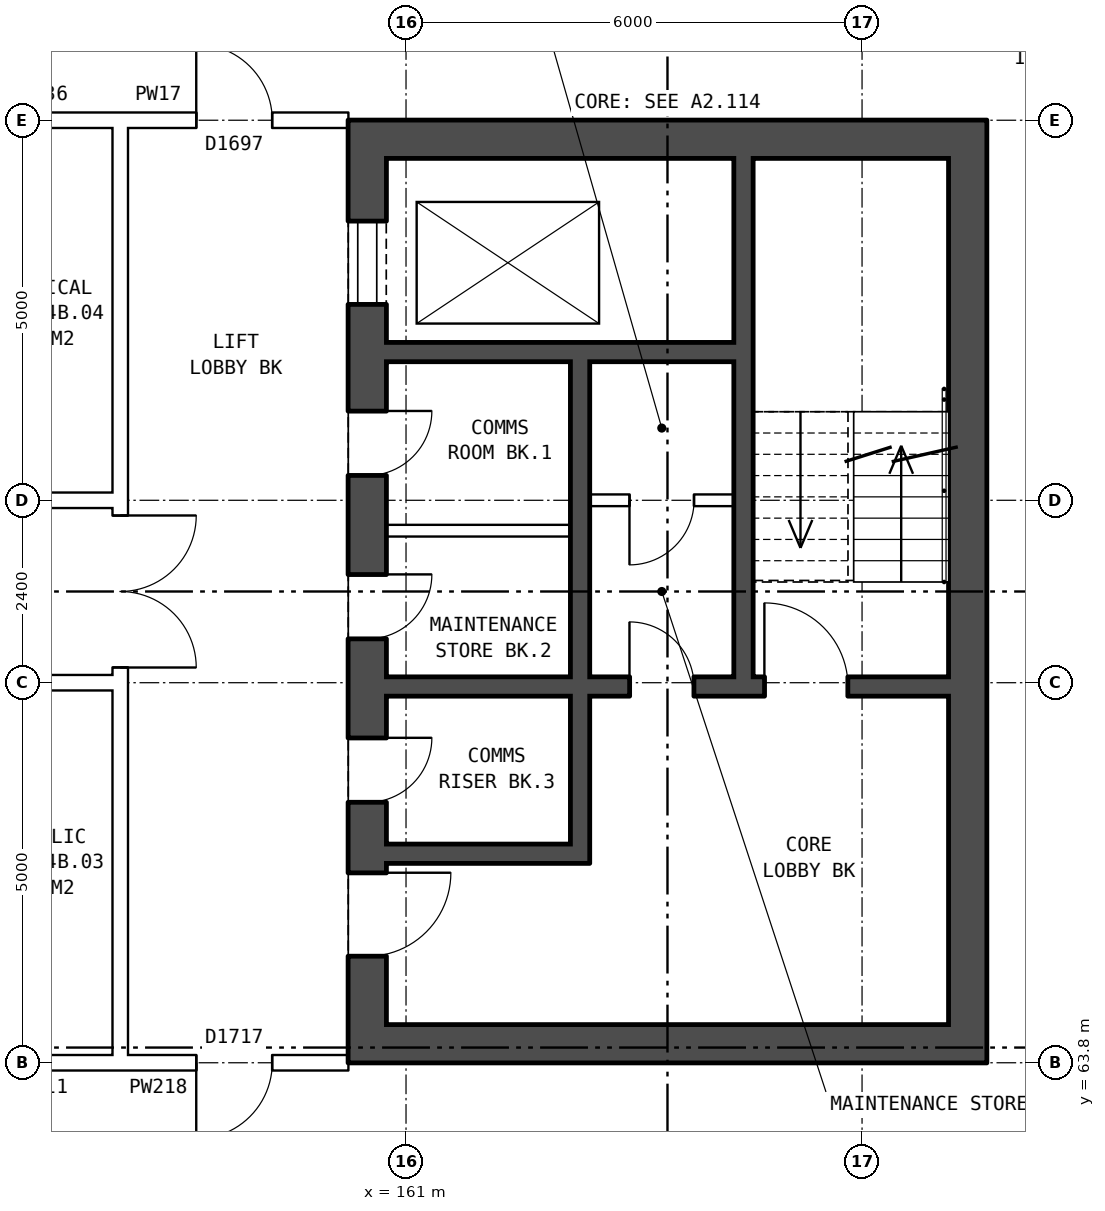
"""IFC4 building model, lengths in metres.
Left out: names, types, materials, properties, quantities, classifications, styles, units other than length and angle.
Written with IfcOpenShell. Run it as: python <this file> out.ifc"""

import sys

from ifc_helpers import new_model, si_unit, direction, frame, frame_2d, origin, place, context, subcontext, project, spatial, rectangle, extrude, element, fill, save


model = new_model("IFC4")
c1 = context("Model", 3, precision=1e-05, world=origin(), true_north=direction((0.0, 1.0)))
c2 = subcontext(c1, "Body", "Model", "MODEL_VIEW")
j1 = project(units=[si_unit("LENGTHUNIT", "METRE"), si_unit("PLANEANGLEUNIT", "RADIAN")], contexts=[c1])
p1 = place(None, origin())
s1 = spatial("IfcSite", under=j1, at=p1, CompositionType="ELEMENT")
p2 = place(p1, origin())
s2 = spatial("IfcBuilding", under=s1, at=p2, CompositionType="ELEMENT")
p3 = place(p2, frame((0.0, 0.0, 157.8)))
s3 = spatial("IfcBuildingStorey", under=s2, at=p3, CompositionType="ELEMENT", Elevation=157.8)
p4 = place(p3, frame((160.49, 76.2, 0.0), z_axis=(0.0, 0.0, 1.0), x_axis=(0.0, -1.0, 0.0)))
e1 = element("IfcWall", 1, at=p4, inside=s3, PredefinedType="SHEAR", context=c2, shape_type="SweptSolid", body=[
    extrude(rectangle(XDim=12.4, YDim=0.5, at=frame_2d((6.2, 0.0))), origin(), (0.0, 0.0, 1.0), 2.85),
])
p5 = place(p4, frame((1.325, 0.0, 0.0)))
e2 = element("IfcOpeningElement", 2, at=p5, cuts=e1, PredefinedType="OPENING", context=c2, shape_type="SweptSolid", body=[
    extrude(rectangle(XDim=1.1, YDim=2.1, at=frame_2d((0.55, 1.05))), frame((0.0, 0.26, 0.0), z_axis=(0.0, -1.0, 0.0), x_axis=(1.0, 0.0, 0.0)), (0.0, 0.0, 1.0), 0.52),
])
p6 = place(p4, frame((3.825, 0.0, 0.0)))
e3 = element("IfcOpeningElement", 3, at=p6, cuts=e1, PredefinedType="OPENING", context=c2, shape_type="SweptSolid", body=[
    extrude(rectangle(XDim=0.85, YDim=2.1, at=frame_2d((0.425, 1.05))), frame((0.0, 0.26, 0.0), z_axis=(0.0, -1.0, 0.0), x_axis=(1.0, 0.0, 0.0)), (0.0, 0.0, 1.0), 0.52),
])
p7 = place(p4, frame((5.975, 0.0, 0.0)))
e4 = element("IfcOpeningElement", 4, at=p7, cuts=e1, PredefinedType="OPENING", context=c2, shape_type="SweptSolid", body=[
    extrude(rectangle(XDim=0.85, YDim=2.1, at=frame_2d((0.425, 1.05))), frame((0.0, 0.26, 0.0), z_axis=(0.0, -1.0, 0.0), x_axis=(1.0, 0.0, 0.0)), (0.0, 0.0, 1.0), 0.52),
])
p8 = place(p4, frame((9.9, 0.0, 0.0)))
e5 = element("IfcOpeningElement", 5, at=p8, cuts=e1, PredefinedType="OPENING", context=c2, shape_type="SweptSolid", body=[
    extrude(rectangle(XDim=1.1, YDim=2.1, at=frame_2d((0.55, 1.05))), frame((0.0, 0.26, 0.0), z_axis=(0.0, -1.0, 0.0), x_axis=(1.0, 0.0, 0.0)), (0.0, 0.0, 1.0), 0.52),
])
p9 = place(p4, frame((8.125, 0.0, 0.0)))
e6 = element("IfcOpeningElement", 6, at=p9, cuts=e1, PredefinedType="OPENING", context=c2, shape_type="SweptSolid", body=[
    extrude(rectangle(XDim=0.85, YDim=2.1, at=frame_2d((0.425, 1.05))), frame((0.0, 0.26, 0.0), z_axis=(0.0, -1.0, 0.0), x_axis=(1.0, 0.0, 0.0)), (0.0, 0.0, 1.0), 0.52),
])
p10 = place(p3, frame((168.39, 76.2, 0.0), z_axis=(0.0, 0.0, 1.0), x_axis=(0.0, -1.0, 0.0)))
e7 = element("IfcWall", 7, at=p10, inside=s3, PredefinedType="SHEAR", context=c2, shape_type="SweptSolid", body=[
    extrude(rectangle(XDim=12.4, YDim=0.5, at=frame_2d((6.2, 0.0))), origin(), (0.0, 0.0, 1.0), 2.85),
])
for number, where, z_axis, x_axis in (
    (8, (160.74, 75.95, 0.0), (0.0, 0.0, 1.0), (1.0, 0.0, 0.0)),
    (9, (160.74, 64.05, 0.0), (0.0, 0.0, 1.0), (1.0, 0.0, 0.0)),
):
    element("IfcWall", number, at=place(p3, frame(where, z_axis=z_axis, x_axis=x_axis)), inside=s3, PredefinedType="SHEAR", context=c2, shape_type="SweptSolid", body=[
        extrude(rectangle(XDim=7.4, YDim=0.5, at=frame_2d((3.7, 0.0))), origin(), (0.0, 0.0, 1.0), 2.85),
    ])
p11 = place(p3, frame((160.74, 73.15, 0.0), z_axis=(0.0, 0.0, 1.0), x_axis=(1.0, 0.0, 0.0)))
e10 = element("IfcWall", 10, at=p11, inside=s3, PredefinedType="SHEAR", context=c2, shape_type="SweptSolid", body=[
    extrude(rectangle(XDim=4.575, YDim=0.25, at=frame_2d((2.288, 0.0))), origin(), (0.0, 0.0, 1.0), 2.85),
])
p12 = place(p3, frame((163.415, 71.2, 0.0), z_axis=(0.0, 0.0, 1.0), x_axis=(1.0, 0.0, 0.0)))
e11 = element("IfcWall", 11, at=p12, inside=s3, PredefinedType="PARTITIONING", context=c2, shape_type="SweptSolid", body=[
    extrude(rectangle(XDim=1.9, YDim=0.15, at=frame_2d((0.95, 0.0))), origin(), (0.0, 0.0, 1.0), 2.85),
])
p13 = place(p12, frame((0.525, 0.0, 0.0)))
e12 = element("IfcOpeningElement", 12, at=p13, cuts=e11, PredefinedType="OPENING", context=c2, shape_type="SweptSolid", body=[
    extrude(rectangle(XDim=0.85, YDim=2.1, at=frame_2d((0.425, 1.05))), frame((0.0, 0.085, 0.0), z_axis=(0.0, -1.0, 0.0), x_axis=(1.0, 0.0, 0.0)), (0.0, 0.0, 1.0), 0.17),
])
p14 = place(p3, frame((160.74, 70.8, 0.0), z_axis=(0.0, 0.0, 1.0), x_axis=(1.0, 0.0, 0.0)))
e13 = element("IfcWall", 13, at=p14, inside=s3, PredefinedType="PARTITIONING", context=c2, shape_type="SweptSolid", body=[
    extrude(rectangle(XDim=2.425, YDim=0.15, at=frame_2d((1.212, 0.0))), origin(), (0.0, 0.0, 1.0), 2.85),
])
p15 = place(p3, frame((160.74, 68.75, 0.0), z_axis=(0.0, 0.0, 1.0), x_axis=(1.0, 0.0, 0.0)))
e14 = element("IfcWall", 14, at=p15, inside=s3, PredefinedType="SHEAR", context=c2, shape_type="SweptSolid", body=[
    extrude(rectangle(XDim=7.4, YDim=0.25, at=frame_2d((3.7, 0.0))), origin(), (0.0, 0.0, 1.0), 2.85),
])
p16 = place(p15, frame((4.975, 0.0, 0.0)))
e15 = element("IfcOpeningElement", 15, at=p16, cuts=e14, PredefinedType="OPENING", context=c2, shape_type="SweptSolid", body=[
    extrude(rectangle(XDim=1.1, YDim=2.1, at=frame_2d((0.55, 1.05))), frame((0.0, 0.135, 0.0), z_axis=(0.0, -1.0, 0.0), x_axis=(1.0, 0.0, 0.0)), (0.0, 0.0, 1.0), 0.27),
])
p17 = place(p15, frame((3.2, 0.0, 0.0)))
e16 = element("IfcOpeningElement", 16, at=p17, cuts=e14, PredefinedType="OPENING", context=c2, shape_type="SweptSolid", body=[
    extrude(rectangle(XDim=0.85, YDim=2.1, at=frame_2d((0.425, 1.05))), frame((0.0, 0.135, 0.0), z_axis=(0.0, -1.0, 0.0), x_axis=(1.0, 0.0, 0.0)), (0.0, 0.0, 1.0), 0.27),
])
p18 = place(p3, frame((160.74, 66.55, 0.0), z_axis=(0.0, 0.0, 1.0), x_axis=(1.0, 0.0, 0.0)))
e17 = element("IfcWall", 17, at=p18, inside=s3, PredefinedType="SHEAR", context=c2, shape_type="SweptSolid", body=[
    extrude(rectangle(XDim=2.425, YDim=0.25, at=frame_2d((1.212, 0.0))), origin(), (0.0, 0.0, 1.0), 2.85),
])
p19 = place(p3, frame((163.29, 73.025, 0.0), z_axis=(0.0, 0.0, 1.0), x_axis=(0.0, -1.0, 0.0)))
e18 = element("IfcWall", 18, at=p19, inside=s3, PredefinedType="SHEAR", context=c2, shape_type="SweptSolid", body=[
    extrude(rectangle(XDim=4.15, YDim=0.25, at=frame_2d((2.075, 0.0))), origin(), (0.0, 0.0, 1.0), 2.85),
])
p20 = place(p3, frame((163.29, 68.625, 0.0), z_axis=(0.0, 0.0, 1.0), x_axis=(0.0, -1.0, 0.0)))
e19 = element("IfcWall", 19, at=p20, inside=s3, PredefinedType="SHEAR", context=c2, shape_type="SweptSolid", body=[
    extrude(rectangle(XDim=2.2, YDim=0.25, at=frame_2d((1.1, 0.0))), origin(), (0.0, 0.0, 1.0), 2.85),
])
p21 = place(p3, frame((165.44, 75.7, 0.0), z_axis=(0.0, 0.0, 1.0), x_axis=(0.0, -1.0, 0.0)))
e20 = element("IfcWall", 20, at=p21, inside=s3, PredefinedType="SHEAR", context=c2, shape_type="SweptSolid", body=[
    extrude(rectangle(XDim=6.825, YDim=0.25, at=frame_2d((3.413, 0.0))), origin(), (0.0, 0.0, 1.0), 2.85),
])
p22 = place(p3, frame((157.24, 63.9, 0.0), z_axis=(0.0, 0.0, 1.0), x_axis=(0.0, 1.0, 0.0)))
e21 = element("IfcWall", 21, at=p22, inside=s3, PredefinedType="PARTITIONING", context=c2, shape_type="SweptSolid", body=[
    extrude(rectangle(XDim=12.2, YDim=0.2, at=frame_2d((6.1, 0.0))), origin(), (0.0, 0.0, 1.0), 2.85),
])
p23 = place(p22, frame((5.1, 0.0, 0.0)))
e22 = element("IfcOpeningElement", 22, at=p23, cuts=e21, PredefinedType="OPENING", context=c2, shape_type="SweptSolid", body=[
    extrude(rectangle(XDim=2.0, YDim=2.1, at=frame_2d((1.0, 1.05))), frame((0.0, 0.11, 0.0), z_axis=(0.0, -1.0, 0.0), x_axis=(1.0, 0.0, 0.0)), (0.0, 0.0, 1.0), 0.22),
])
p24 = place(p3, frame((155.1, 63.8, 0.0), z_axis=(0.0, 0.0, 1.0), x_axis=(1.0, 0.0, 0.0)))
e23 = element("IfcWall", 23, at=p24, inside=s3, PredefinedType="PARTITIONING", context=c2, shape_type="SweptSolid", body=[
    extrude(rectangle(XDim=2.14, YDim=0.2, at=frame_2d((1.07, 0.0))), origin(), (0.0, 0.0, 1.0), 2.85),
])
p25 = place(p3, frame((157.24, 63.8, 0.0), z_axis=(0.0, 0.0, 1.0), x_axis=(1.0, 0.0, 0.0)))
e24 = element("IfcWall", 24, at=p25, inside=s3, PredefinedType="PARTITIONING", context=c2, shape_type="SweptSolid", body=[
    extrude(rectangle(XDim=3.0, YDim=0.2, at=frame_2d((1.5, 0.0))), origin(), (0.0, 0.0, 1.0), 2.85),
])
p26 = place(p25, frame((1.0, 0.0, 0.0)))
e25 = element("IfcOpeningElement", 25, at=p26, cuts=e24, PredefinedType="OPENING", context=c2, shape_type="SweptSolid", body=[
    extrude(rectangle(XDim=1.0, YDim=2.1, at=frame_2d((0.5, 1.05))), frame((0.0, 0.11, 0.0), z_axis=(0.0, -1.0, 0.0), x_axis=(1.0, 0.0, 0.0)), (0.0, 0.0, 1.0), 0.22),
])
p27 = place(p3, frame((142.76, 68.8, 0.0), z_axis=(0.0, 0.0, 1.0), x_axis=(1.0, 0.0, 0.0)))
e26 = element("IfcWall", 26, at=p27, inside=s3, PredefinedType="PARTITIONING", context=c2, shape_type="SweptSolid", body=[
    extrude(rectangle(XDim=14.48, YDim=0.2, at=frame_2d((7.24, 0.0))), origin(), (0.0, 0.0, 1.0), 2.85),
])
p28 = place(p27, frame((1.12, 0.0, 0.0)))
e27 = element("IfcOpeningElement", 27, at=p28, cuts=e26, PredefinedType="OPENING", context=c2, shape_type="SweptSolid", body=[
    extrude(rectangle(XDim=1.0, YDim=2.1, at=frame_2d((0.5, 1.05))), frame((0.0, 0.11, 0.0), z_axis=(0.0, -1.0, 0.0), x_axis=(1.0, 0.0, 0.0)), (0.0, 0.0, 1.0), 0.22),
])
p29 = place(p27, frame((7.24, 0.0, 0.0)))
e28 = element("IfcOpeningElement", 28, at=p29, cuts=e26, PredefinedType="OPENING", context=c2, shape_type="SweptSolid", body=[
    extrude(rectangle(XDim=1.0, YDim=2.1, at=frame_2d((0.5, 1.05))), frame((0.0, 0.11, 0.0), z_axis=(0.0, -1.0, 0.0), x_axis=(1.0, 0.0, 0.0)), (0.0, 0.0, 1.0), 0.22),
])
p30 = place(p3, frame((142.76, 71.2, 0.0), z_axis=(0.0, 0.0, 1.0), x_axis=(1.0, 0.0, 0.0)))
e29 = element("IfcWall", 29, at=p30, inside=s3, PredefinedType="PARTITIONING", context=c2, shape_type="SweptSolid", body=[
    extrude(rectangle(XDim=14.48, YDim=0.2, at=frame_2d((7.24, 0.0))), origin(), (0.0, 0.0, 1.0), 2.85),
])
p31 = place(p30, frame((4.24, 0.0, 0.0)))
e30 = element("IfcOpeningElement", 30, at=p31, cuts=e29, PredefinedType="OPENING", context=c2, shape_type="SweptSolid", body=[
    extrude(rectangle(XDim=1.0, YDim=2.1, at=frame_2d((0.5, 1.05))), frame((0.0, 0.11, 0.0), z_axis=(0.0, -1.0, 0.0), x_axis=(1.0, 0.0, 0.0)), (0.0, 0.0, 1.0), 0.22),
])
p32 = place(p30, frame((7.24, 0.0, 0.0)))
e31 = element("IfcOpeningElement", 31, at=p32, cuts=e29, PredefinedType="OPENING", context=c2, shape_type="SweptSolid", body=[
    extrude(rectangle(XDim=1.0, YDim=2.1, at=frame_2d((0.5, 1.05))), frame((0.0, 0.11, 0.0), z_axis=(0.0, -1.0, 0.0), x_axis=(1.0, 0.0, 0.0)), (0.0, 0.0, 1.0), 0.22),
])
p33 = place(p3, frame((155.1, 76.2, 0.0), z_axis=(0.0, 0.0, 1.0), x_axis=(1.0, 0.0, 0.0)))
e32 = element("IfcWall", 32, at=p33, inside=s3, PredefinedType="PARTITIONING", context=c2, shape_type="SweptSolid", body=[
    extrude(rectangle(XDim=2.14, YDim=0.2, at=frame_2d((1.07, 0.0))), origin(), (0.0, 0.0, 1.0), 2.85),
])
p34 = place(p3, frame((157.24, 76.2, 0.0), z_axis=(0.0, 0.0, 1.0), x_axis=(1.0, 0.0, 0.0)))
e33 = element("IfcWall", 33, at=p34, inside=s3, PredefinedType="PARTITIONING", context=c2, shape_type="SweptSolid", body=[
    extrude(rectangle(XDim=3.0, YDim=0.2, at=frame_2d((1.5, 0.0))), origin(), (0.0, 0.0, 1.0), 2.85),
])
p35 = place(p34, frame((1.0, 0.0, 0.0)))
e34 = element("IfcOpeningElement", 34, at=p35, cuts=e33, PredefinedType="OPENING", context=c2, shape_type="SweptSolid", body=[
    extrude(rectangle(XDim=1.0, YDim=2.1, at=frame_2d((0.5, 1.05))), frame((0.0, 0.11, 0.0), z_axis=(0.0, -1.0, 0.0), x_axis=(1.0, 0.0, 0.0)), (0.0, 0.0, 1.0), 0.22),
])
p36 = place(p5, origin())
e35 = element("IfcDoor", 35, at=p36, inside=s3, OperationType="DOUBLE_DOOR_SLIDING", PredefinedType="DOOR", context=c2, shape_type="SweptSolid", body=[
    extrude(rectangle(XDim=1.1, YDim=2.1, at=frame_2d((0.55, 1.05))), frame((0.0, 0.235, 0.0), z_axis=(0.0, -1.0, 0.0), x_axis=(1.0, 0.0, 0.0)), (0.0, 0.0, 1.0), 0.05),
])
fill(e2, e35)
p37 = place(p6, origin())
e36 = element("IfcDoor", 36, at=p37, inside=s3, OperationType="SINGLE_SWING_LEFT", PredefinedType="DOOR", context=c2, shape_type="SweptSolid", body=[
    extrude(rectangle(XDim=0.85, YDim=2.1, at=frame_2d((0.425, 1.05))), frame((0.0, 0.235, 0.0), z_axis=(0.0, -1.0, 0.0), x_axis=(1.0, 0.0, 0.0)), (0.0, 0.0, 1.0), 0.05),
])
fill(e3, e36)
p38 = place(p7, origin())
e37 = element("IfcDoor", 37, at=p38, inside=s3, OperationType="SINGLE_SWING_LEFT", PredefinedType="DOOR", context=c2, shape_type="SweptSolid", body=[
    extrude(rectangle(XDim=0.85, YDim=2.1, at=frame_2d((0.425, 1.05))), frame((0.0, 0.235, 0.0), z_axis=(0.0, -1.0, 0.0), x_axis=(1.0, 0.0, 0.0)), (0.0, 0.0, 1.0), 0.05),
])
fill(e4, e37)
p39 = place(p8, origin())
e38 = element("IfcDoor", 38, at=p39, inside=s3, OperationType="SINGLE_SWING_LEFT", PredefinedType="DOOR", context=c2, shape_type="SweptSolid", body=[
    extrude(rectangle(XDim=1.1, YDim=2.1, at=frame_2d((0.55, 1.05))), frame((0.0, 0.235, 0.0), z_axis=(0.0, -1.0, 0.0), x_axis=(1.0, 0.0, 0.0)), (0.0, 0.0, 1.0), 0.05),
])
fill(e5, e38)
p40 = place(p16, origin())
e39 = element("IfcDoor", 39, at=p40, inside=s3, OperationType="SINGLE_SWING_LEFT", PredefinedType="DOOR", context=c2, shape_type="SweptSolid", body=[
    extrude(rectangle(XDim=1.1, YDim=2.1, at=frame_2d((0.55, 1.05))), frame((0.0, 0.025, 0.0), z_axis=(0.0, -1.0, 0.0), x_axis=(1.0, 0.0, 0.0)), (0.0, 0.0, 1.0), 0.05),
])
fill(e15, e39)
p41 = place(p9, origin())
e40 = element("IfcDoor", 40, at=p41, inside=s3, OperationType="SINGLE_SWING_LEFT", PredefinedType="DOOR", context=c2, shape_type="SweptSolid", body=[
    extrude(rectangle(XDim=0.85, YDim=2.1, at=frame_2d((0.425, 1.05))), frame((0.0, 0.235, 0.0), z_axis=(0.0, -1.0, 0.0), x_axis=(1.0, 0.0, 0.0)), (0.0, 0.0, 1.0), 0.05),
])
fill(e6, e40)
p42 = place(p17, origin())
e41 = element("IfcDoor", 41, at=p42, inside=s3, OperationType="SINGLE_SWING_LEFT", PredefinedType="DOOR", context=c2, shape_type="SweptSolid", body=[
    extrude(rectangle(XDim=0.85, YDim=2.1, at=frame_2d((0.425, 1.05))), frame((0.0, 0.025, 0.0), z_axis=(0.0, -1.0, 0.0), x_axis=(1.0, 0.0, 0.0)), (0.0, 0.0, 1.0), 0.05),
])
fill(e16, e41)
p43 = place(p13, frame((0.85, 0.0, 0.0), z_axis=(0.0, 0.0, 1.0), x_axis=(-1.0, 0.0, 0.0)))
e42 = element("IfcDoor", 42, at=p43, inside=s3, OperationType="SINGLE_SWING_RIGHT", PredefinedType="DOOR", context=c2, shape_type="SweptSolid", body=[
    extrude(rectangle(XDim=0.85, YDim=2.1, at=frame_2d((0.425, 1.05))), frame((0.0, 0.025, 0.0), z_axis=(0.0, -1.0, 0.0), x_axis=(1.0, 0.0, 0.0)), (0.0, 0.0, 1.0), 0.05),
])
fill(e12, e42)
p44 = place(p23, frame((2.0, 0.0, 0.0), z_axis=(0.0, 0.0, 1.0), x_axis=(-1.0, 0.0, 0.0)))
e43 = element("IfcDoor", 43, at=p44, inside=s3, OperationType="DOUBLE_DOOR_SINGLE_SWING", PredefinedType="DOOR", context=c2, shape_type="SweptSolid", body=[
    extrude(rectangle(XDim=2.0, YDim=2.1, at=frame_2d((1.0, 1.05))), frame((0.0, 0.025, 0.0), z_axis=(0.0, -1.0, 0.0), x_axis=(1.0, 0.0, 0.0)), (0.0, 0.0, 1.0), 0.05),
])
fill(e22, e43)
p45 = place(p26, frame((1.0, 0.0, 0.0), z_axis=(0.0, 0.0, 1.0), x_axis=(-1.0, 0.0, 0.0)))
e44 = element("IfcDoor", 44, at=p45, inside=s3, OperationType="SINGLE_SWING_RIGHT", PredefinedType="DOOR", context=c2, shape_type="SweptSolid", body=[
    extrude(rectangle(XDim=1.0, YDim=2.1, at=frame_2d((0.5, 1.05))), frame((0.0, 0.025, 0.0), z_axis=(0.0, -1.0, 0.0), x_axis=(1.0, 0.0, 0.0)), (0.0, 0.0, 1.0), 0.05),
])
fill(e25, e44)
p46 = place(p35, origin())
e45 = element("IfcDoor", 45, at=p46, inside=s3, OperationType="SINGLE_SWING_LEFT", PredefinedType="DOOR", context=c2, shape_type="SweptSolid", body=[
    extrude(rectangle(XDim=1.0, YDim=2.1, at=frame_2d((0.5, 1.05))), frame((0.0, 0.025, 0.0), z_axis=(0.0, -1.0, 0.0), x_axis=(1.0, 0.0, 0.0)), (0.0, 0.0, 1.0), 0.05),
])
fill(e34, e45)
save(model, sys.argv[1])
